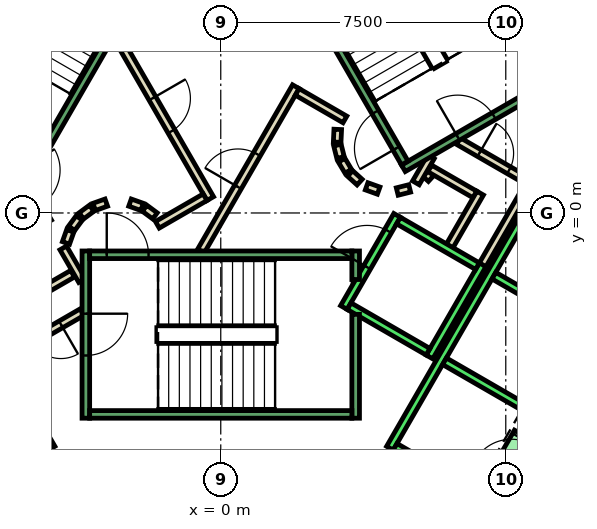
"""IFC4 building model, lengths in metres.
Left out: names, types, materials, properties, quantities, classifications, styles, units other than length and angle.
Written with IfcOpenShell. Run it as: python <this file> out.ifc"""

import sys

from ifc_helpers import new_model, si_unit, direction, frame, frame_2d, origin, place, context, subcontext, project, spatial, polyline, rectangle, outline, extrude, element, fill, save


model = new_model("IFC4")
c1 = context("Model", 3, precision=1e-05, world=origin(), true_north=direction((0.0, 1.0)))
c2 = subcontext(c1, "Body", "Model", "MODEL_VIEW")
j1 = project(units=[si_unit("LENGTHUNIT", "METRE"), si_unit("PLANEANGLEUNIT", "RADIAN")], contexts=[c1])
p1 = place(None, origin())
s1 = spatial("IfcSite", under=j1, at=p1, CompositionType="ELEMENT")
p2 = place(p1, origin())
s2 = spatial("IfcBuilding", under=s1, at=p2, CompositionType="ELEMENT")
p3 = place(p2, frame((0.0, 0.0, 146.6)))
s3 = spatial("IfcBuildingStorey", under=s2, at=p3, CompositionType="ELEMENT", Elevation=146.6)
p4 = place(p3, frame((0.0, 0.0, 3.6)))
e1 = element("IfcWall", 1, at=p4, inside=s3, PredefinedType="SHEAR", context=c2, shape_type="SweptSolid", body=[
    extrude(outline(polyline([(8.767, -6.314), (8.075, -5.914), (7.424, -7.04), (8.117, -7.44), (8.767, -6.314)])), origin(), (0.0, 0.0, 1.0), 0.2),
])
p5 = place(p3, frame((5.39, 0.898, 0.0), z_axis=(0.0, 0.0, 1.0), x_axis=(0.673828488714, 0.738887791073, 0.0)))
e2 = element("IfcWall", 2, at=p5, inside=s3, PredefinedType="PARTITIONING", context=c2, shape_type="SweptSolid", body=[
    extrude(rectangle(XDim=0.263, YDim=0.2, at=frame_2d((0.131, 0.0))), origin(), (0.0, 0.0, 1.0), 3.8),
])
p6 = place(p3, frame((5.499, 1.172, 0.0), z_axis=(0.0, 0.0, 1.0), x_axis=(0.866333505267, -0.499465972466, 0.0)))
e3 = element("IfcWall", 3, at=p6, inside=s3, PredefinedType="PARTITIONING", context=c2, shape_type="SweptSolid", body=[
    extrude(rectangle(XDim=1.374, YDim=0.2, at=frame_2d((0.687, 0.0))), origin(), (0.0, 0.0, 1.0), 3.8),
])
p7 = place(p3, frame((6.826, 0.522, 0.0), z_axis=(0.0, 0.0, 1.0), x_axis=(-0.500016722714, -0.866015748706, 0.0)))
e4 = element("IfcWall", 4, at=p7, inside=s3, PredefinedType="PARTITIONING", context=c2, shape_type="SweptSolid", body=[
    extrude(rectangle(XDim=1.7, YDim=0.2, at=frame_2d((0.85, 0.0))), origin(), (0.0, 0.0, 1.0), 3.8),
])
p8 = place(p3, frame((6.25, 1.894, 0.0), z_axis=(0.0, 0.0, 1.0), x_axis=(0.866043184279, -0.499969202016, 0.0)))
e5 = element("IfcWall", 5, at=p8, inside=s3, PredefinedType="PARTITIONING", context=c2, shape_type="SweptSolid", body=[
    extrude(rectangle(XDim=2.084, YDim=0.2, at=frame_2d((1.042, 0.0))), origin(), (0.0, 0.0, 1.0), 3.8),
])
p9 = place(p8, frame((0.642, 0.0, 0.0)))
e6 = element("IfcOpeningElement", 6, at=p9, cuts=e5, PredefinedType="OPENING", context=c2, shape_type="SweptSolid", body=[
    extrude(rectangle(XDim=0.9, YDim=2.1, at=frame_2d((0.45, 1.05))), frame((0.0, 0.11, 0.0), z_axis=(0.0, -1.0, 0.0), x_axis=(1.0, 0.0, 0.0)), (0.0, 0.0, 1.0), 0.22),
])
p10 = place(p3, frame((8.192, 0.888, 0.0), z_axis=(0.0, 0.0, 1.0), x_axis=(-0.499940625693, -0.866059680843, 0.0)))
e7 = element("IfcWall", 7, at=p10, inside=s3, PredefinedType="PARTITIONING", context=c2, shape_type="SweptSolid", body=[
    extrude(rectangle(XDim=2.68, YDim=0.2, at=frame_2d((1.34, 0.0))), origin(), (0.0, 0.0, 1.0), 3.8),
])
p11 = place(p3, frame((5.135, 0.793, 0.0), z_axis=(0.0, 0.0, 1.0), x_axis=(0.499526442893, 0.866298639529, 0.0)))
e8 = element("IfcWall", 8, at=p11, inside=s3, PredefinedType="PARTITIONING", context=c2, shape_type="SweptSolid", body=[
    extrude(rectangle(XDim=0.791, YDim=0.2, at=frame_2d((0.396, 0.0))), origin(), (0.0, 0.0, 1.0), 3.8),
])
p12 = place(p3, frame((-3.9, -1.599, 0.0), z_axis=(0.0, 0.0, 1.0), x_axis=(-0.865969445389, -0.500096910261, 0.0)))
e9 = element("IfcWall", 9, at=p12, inside=s3, PredefinedType="PARTITIONING", context=c2, shape_type="SweptSolid", body=[
    extrude(rectangle(XDim=1.373, YDim=0.2, at=frame_2d((0.687, 0.0))), origin(), (0.0, 0.0, 1.0), 3.8),
])
p13 = place(p3, frame((-3.65, -2.61, 0.0), z_axis=(0.0, 0.0, 1.0), x_axis=(-0.866072462134, -0.499918483688, 0.0)))
e10 = element("IfcWall", 10, at=p13, inside=s3, PredefinedType="PARTITIONING", context=c2, shape_type="SweptSolid", body=[
    extrude(rectangle(XDim=2.084, YDim=0.2, at=frame_2d((1.042, 0.0))), origin(), (0.0, 0.0, 1.0), 3.8),
])
p14 = place(p13, frame((0.642, 0.0, 0.0)))
e11 = element("IfcOpeningElement", 11, at=p14, cuts=e10, PredefinedType="OPENING", context=c2, shape_type="SweptSolid", body=[
    extrude(rectangle(XDim=0.9, YDim=2.1, at=frame_2d((0.45, 1.05))), frame((0.0, 0.11, 0.0), z_axis=(0.0, -1.0, 0.0), x_axis=(1.0, 0.0, 0.0)), (0.0, 0.0, 1.0), 0.22),
])
p15 = place(p3, frame((-4.145, -0.92, 0.0), z_axis=(0.0, 0.0, 1.0), x_axis=(0.499743786207, -0.866173278362, 0.0)))
e12 = element("IfcWall", 12, at=p15, inside=s3, PredefinedType="PARTITIONING", context=c2, shape_type="SweptSolid", body=[
    extrude(rectangle(XDim=0.991, YDim=0.2, at=frame_2d((0.495, 0.0))), origin(), (0.0, 0.0, 1.0), 3.8),
])
p16 = place(p3, frame((-0.52, -1.0, 0.0), z_axis=(0.0, 0.0, 1.0), x_axis=(0.50011622646, 0.865958290007, 0.0)))
e13 = element("IfcWall", 13, at=p16, inside=s3, PredefinedType="PARTITIONING", context=c2, shape_type="SweptSolid", body=[
    extrude(rectangle(XDim=4.991, YDim=0.2, at=frame_2d((2.496, 0.0))), origin(), (0.0, 0.0, 1.0), 3.8),
])
p17 = place(p16, frame((1.945, 0.0, 0.0)))
e14 = element("IfcOpeningElement", 14, at=p17, cuts=e13, PredefinedType="OPENING", context=c2, shape_type="SweptSolid", body=[
    extrude(rectangle(XDim=1.0, YDim=2.1, at=frame_2d((0.5, 1.05))), frame((0.0, 0.11, 0.0), z_axis=(0.0, -1.0, 0.0), x_axis=(1.0, 0.0, 0.0)), (0.0, 0.0, 1.0), 0.22),
])
p18 = place(p3, frame((2.012, 3.186, 0.0), z_axis=(0.0, 0.0, 1.0), x_axis=(0.865891012941, -0.500232699559, 0.0)))
e15 = element("IfcWall", 15, at=p18, inside=s3, PredefinedType="PARTITIONING", context=c2, shape_type="SweptSolid", body=[
    extrude(rectangle(XDim=1.449, YDim=0.2, at=frame_2d((0.725, 0.0))), origin(), (0.0, 0.0, 1.0), 3.8),
])
p19 = place(p3, frame((3.079, 2.199, 0.0), z_axis=(0.0, 0.0, 1.0), x_axis=(-0.047771483479, -0.998858290933, 0.0)))
e16 = element("IfcWall", 16, at=p19, inside=s3, PredefinedType="PARTITIONING", context=c2, shape_type="SweptSolid", body=[
    extrude(rectangle(XDim=0.337, YDim=0.2, at=frame_2d((0.169, 0.0))), origin(), (0.0, 0.0, 1.0), 3.8),
])
p20 = place(p3, frame((3.07, 1.786, 0.0), z_axis=(0.0, 0.0, 1.0), x_axis=(0.242705583207, -0.970099994784, 0.0)))
e17 = element("IfcWall", 17, at=p20, inside=s3, PredefinedType="PARTITIONING", context=c2, shape_type="SweptSolid", body=[
    extrude(rectangle(XDim=0.338, YDim=0.2, at=frame_2d((0.169, 0.0))), origin(), (0.0, 0.0, 1.0), 3.8),
])
for number, where, z_axis, x_axis in (
    (18, (3.182, 1.388, 0.0), (0.0, 0.0, 1.0), (0.512, -0.859, 0.0)),
    (19, (3.404, 1.039, 0.0), (0.0, 0.0, 1.0), (0.74, -0.672, 0.0)),
):
    element("IfcWall", number, at=place(p3, frame(where, z_axis=z_axis, x_axis=x_axis)), inside=s3, PredefinedType="PARTITIONING", context=c2, shape_type="SweptSolid", body=[
        extrude(rectangle(XDim=0.338, YDim=0.2, at=frame_2d((0.169, 0.0))), origin(), (0.0, 0.0, 1.0), 3.8),
    ])
p21 = place(p3, frame((3.838, 0.702, 0.0), z_axis=(0.0, 0.0, 1.0), x_axis=(0.941035081519, -0.338308993895, 0.0)))
e20 = element("IfcWall", 20, at=p21, inside=s3, PredefinedType="PARTITIONING", context=c2, shape_type="SweptSolid", body=[
    extrude(rectangle(XDim=0.337, YDim=0.2, at=frame_2d((0.168, 0.0))), origin(), (0.0, 0.0, 1.0), 3.8),
])
p22 = place(p3, frame((4.644, 0.564, 0.0), z_axis=(0.0, 0.0, 1.0), x_axis=(0.969929076366, 0.243387729394, 0.0)))
e21 = element("IfcWall", 21, at=p22, inside=s3, PredefinedType="PARTITIONING", context=c2, shape_type="SweptSolid", body=[
    extrude(rectangle(XDim=0.337, YDim=0.2, at=frame_2d((0.168, 0.0))), origin(), (0.0, 0.0, 1.0), 3.8),
])
p23 = place(p3, frame((-2.771, 4.7, 0.0), z_axis=(0.0, 0.0, 1.0), x_axis=(0.499969479948, -0.866043023828, 0.0)))
e22 = element("IfcWall", 22, at=p23, inside=s3, PredefinedType="PARTITIONING", context=c2, shape_type="SweptSolid", body=[
    extrude(rectangle(XDim=4.99, YDim=0.2, at=frame_2d((2.495, 0.0))), origin(), (0.0, 0.0, 1.0), 3.8),
])
p24 = place(p23, frame((1.945, 0.0, 0.0)))
e23 = element("IfcOpeningElement", 23, at=p24, cuts=e22, PredefinedType="OPENING", context=c2, shape_type="SweptSolid", body=[
    extrude(rectangle(XDim=1.0, YDim=2.1, at=frame_2d((0.5, 1.05))), frame((0.0, 0.11, 0.0), z_axis=(0.0, -1.0, 0.0), x_axis=(1.0, 0.0, 0.0)), (0.0, 0.0, 1.0), 0.22),
])
p25 = place(p3, frame((-0.412, 0.414, 0.0), z_axis=(0.0, 0.0, 1.0), x_axis=(-0.866017369001, -0.500013916395, 0.0)))
e24 = element("IfcWall", 24, at=p25, inside=s3, PredefinedType="PARTITIONING", context=c2, shape_type="SweptSolid", body=[
    extrude(rectangle(XDim=1.45, YDim=0.2, at=frame_2d((0.725, 0.0))), origin(), (0.0, 0.0, 1.0), 3.8),
])
p26 = place(p3, frame((-1.731, -0.077, 0.0), z_axis=(0.0, 0.0, 1.0), x_axis=(-0.804311165252, 0.594208338422, 0.0)))
e25 = element("IfcWall", 25, at=p26, inside=s3, PredefinedType="PARTITIONING", context=c2, shape_type="SweptSolid", body=[
    extrude(rectangle(XDim=0.338, YDim=0.2, at=frame_2d((0.169, 0.0))), origin(), (0.0, 0.0, 1.0), 3.8),
])
p27 = place(p3, frame((-2.07, 0.16, 0.0), z_axis=(0.0, 0.0, 1.0), x_axis=(-0.942199461132, 0.335052496547, 0.0)))
e26 = element("IfcWall", 26, at=p27, inside=s3, PredefinedType="PARTITIONING", context=c2, shape_type="SweptSolid", body=[
    extrude(rectangle(XDim=0.337, YDim=0.2, at=frame_2d((0.169, 0.0))), origin(), (0.0, 0.0, 1.0), 3.8),
])
p28 = place(p3, frame((-3.012, 0.273, 0.0), z_axis=(0.0, 0.0, 1.0), x_axis=(-0.942280615813, -0.334824194261, 0.0)))
e27 = element("IfcWall", 27, at=p28, inside=s3, PredefinedType="PARTITIONING", context=c2, shape_type="SweptSolid", body=[
    extrude(rectangle(XDim=0.338, YDim=0.2, at=frame_2d((0.169, 0.0))), origin(), (0.0, 0.0, 1.0), 3.8),
])
p29 = place(p3, frame((-3.397, 0.124, 0.0), z_axis=(0.0, 0.0, 1.0), x_axis=(-0.804311165252, -0.594208338422, 0.0)))
e28 = element("IfcWall", 28, at=p29, inside=s3, PredefinedType="PARTITIONING", context=c2, shape_type="SweptSolid", body=[
    extrude(rectangle(XDim=0.338, YDim=0.2, at=frame_2d((0.169, 0.0))), origin(), (0.0, 0.0, 1.0), 3.8),
])
p30 = place(p3, frame((-3.723, -0.131, 0.0), z_axis=(0.0, 0.0, 1.0), x_axis=(-0.594675113454, -0.803966112121, 0.0)))
e29 = element("IfcWall", 29, at=p30, inside=s3, PredefinedType="PARTITIONING", context=c2, shape_type="SweptSolid", body=[
    extrude(rectangle(XDim=0.338, YDim=0.2, at=frame_2d((0.169, 0.0))), origin(), (0.0, 0.0, 1.0), 3.8),
])
p31 = place(p3, frame((-3.96, -0.47, 0.0), z_axis=(0.0, 0.0, 1.0), x_axis=(-0.334824194261, -0.942280615813, 0.0)))
e30 = element("IfcWall", 30, at=p31, inside=s3, PredefinedType="PARTITIONING", context=c2, shape_type="SweptSolid", body=[
    extrude(rectangle(XDim=0.338, YDim=0.2, at=frame_2d((0.169, 0.0))), origin(), (0.0, 0.0, 1.0), 3.8),
])
p32 = place(p3, frame((-9.751, 2.99, 0.0), z_axis=(0.0, 0.0, 1.0), x_axis=(0.50000090737, -0.866024879913, 0.0)))
e31 = element("IfcWall", 31, at=p32, inside=s3, PredefinedType="STANDARD", context=c2, shape_type="SweptSolid", body=[
    extrude(rectangle(XDim=10.6, YDim=0.2, at=frame_2d((5.3, 0.0))), origin(), (0.0, 0.0, 1.0), 3.8),
])
p33 = place(p3, frame((3.24, -2.488, 0.0), z_axis=(0.0, 0.0, 1.0), x_axis=(0.49994636267, 0.866056369097, 0.0)))
e32 = element("IfcWall", 32, at=p33, inside=s3, PredefinedType="STANDARD", context=c2, shape_type="SweptSolid", body=[
    extrude(rectangle(XDim=2.8, YDim=0.2, at=frame_2d((1.4, 0.0))), origin(), (0.0, 0.0, 1.0), 3.8),
])
p34 = place(p33, frame((1.225, 0.0, 0.0)))
e33 = element("IfcOpeningElement", 33, at=p34, cuts=e32, PredefinedType="OPENING", context=c2, shape_type="SweptSolid", body=[
    extrude(rectangle(XDim=1.1, YDim=2.1, at=frame_2d((0.55, 1.05))), frame((0.0, 0.11, 0.0), z_axis=(0.0, -1.0, 0.0), x_axis=(1.0, 0.0, 0.0)), (0.0, 0.0, 1.0), 0.22),
])
p35 = place(p3, frame((5.492, -3.788, 0.0), z_axis=(0.0, 0.0, 1.0), x_axis=(0.500011755427, 0.866018616679, 0.0)))
e34 = element("IfcWall", 34, at=p35, inside=s3, PredefinedType="STANDARD", context=c2, shape_type="SweptSolid", body=[
    extrude(rectangle(XDim=2.8, YDim=0.2, at=frame_2d((1.4, 0.0))), origin(), (0.0, 0.0, 1.0), 3.8),
])
p36 = place(p3, frame((3.377, -2.452, 0.0), z_axis=(0.0, 0.0, 1.0), x_axis=(0.865955154139, -0.50012165622, 0.0)))
e35 = element("IfcWall", 35, at=p36, inside=s3, PredefinedType="STANDARD", context=c2, shape_type="SweptSolid", body=[
    extrude(rectangle(XDim=2.4, YDim=0.2, at=frame_2d((1.2, 0.0))), origin(), (0.0, 0.0, 1.0), 3.8),
])
p37 = place(p3, frame((4.677, -0.2, 0.0), z_axis=(0.0, 0.0, 1.0), x_axis=(0.865973769406, -0.500089422704, 0.0)))
e36 = element("IfcWall", 36, at=p37, inside=s3, PredefinedType="STANDARD", context=c2, shape_type="SweptSolid", body=[
    extrude(rectangle(XDim=2.399, YDim=0.2, at=frame_2d((1.2, 0.0))), origin(), (0.0, 0.0, 1.0), 3.8),
])
p38 = place(p3, frame((4.451, -6.19, 0.0), z_axis=(0.0, 0.0, 1.0), x_axis=(0.50000090737, 0.866024879913, 0.0)))
e37 = element("IfcWall", 37, at=p38, inside=s3, PredefinedType="STANDARD", context=c2, shape_type="SweptSolid", body=[
    extrude(rectangle(XDim=10.6, YDim=0.2, at=frame_2d((5.3, 0.0))), origin(), (0.0, 0.0, 1.0), 3.8),
])
for number, where, z_axis, x_axis in (
    (38, (4.588, -6.153, 0.0), (0.0, 0.0, 1.0), (0.866, -0.5, 0.0)),
    (39, (5.888, -3.902, 0.0), (0.0, 0.0, 1.0), (0.866, -0.5, 0.0)),
    (40, (7.188, -1.65, 0.0), (0.0, 0.0, 1.0), (0.866, -0.5, 0.0)),
):
    element("IfcWall", number, at=place(p3, frame(where, z_axis=z_axis, x_axis=x_axis)), inside=s3, PredefinedType="STANDARD", context=c2, shape_type="SweptSolid", body=[
        extrude(rectangle(XDim=2.5, YDim=0.2, at=frame_2d((1.25, 0.0))), origin(), (0.0, 0.0, 1.0), 3.8),
    ])
p39 = place(p3, frame((7.598, -7.14, 0.0), z_axis=(0.0, 0.0, 1.0), x_axis=(0.500362116554, 0.865816234728, 0.0)))
e41 = element("IfcWall", 41, at=p39, inside=s3, PredefinedType="STANDARD", context=c2, shape_type="SweptSolid", body=[
    extrude(rectangle(XDim=1.299, YDim=1.2, at=frame_2d((0.65, 0.0))), origin(), (0.0, 0.0, 1.0), 2.4),
])
p40 = place(p39, frame((0.1, 0.0, 0.0)))
e42 = element("IfcOpeningElement", 42, at=p40, cuts=e41, PredefinedType="OPENING", context=c2, shape_type="SweptSolid", body=[
    extrude(rectangle(XDim=1.1, YDim=2.3, at=frame_2d((0.55, 1.15))), frame((0.0, 0.61, 0.0), z_axis=(0.0, -1.0, 0.0), x_axis=(1.0, 0.0, 0.0)), (0.0, 0.0, 1.0), 1.22),
])
p41 = place(p3, frame((-3.55, -1.0, 0.0), z_axis=(0.0, 0.0, 1.0), x_axis=(0.0, -1.0, 0.0)))
e43 = element("IfcWall", 43, at=p41, inside=s3, PredefinedType="STANDARD", context=c2, shape_type="SweptSolid", body=[
    extrude(rectangle(XDim=4.4, YDim=0.2, at=frame_2d((2.2, 0.0))), origin(), (0.0, 0.0, 1.0), 3.8),
])
p42 = place(p41, frame((1.65, 0.0, 0.0)))
e44 = element("IfcOpeningElement", 44, at=p42, cuts=e43, PredefinedType="OPENING", context=c2, shape_type="SweptSolid", body=[
    extrude(rectangle(XDim=1.1, YDim=2.2, at=frame_2d((0.55, 1.1))), frame((0.0, 0.11, 0.0), z_axis=(0.0, -1.0, 0.0), x_axis=(1.0, 0.0, 0.0)), (0.0, 0.0, 1.0), 0.22),
])
p43 = place(p3, frame((3.55, -2.667, 0.0), z_axis=(0.0, 0.0, 1.0), x_axis=(0.0, -1.0, 0.0)))
e45 = element("IfcWall", 45, at=p43, inside=s3, PredefinedType="STANDARD", context=c2, shape_type="SweptSolid", body=[
    extrude(rectangle(XDim=2.733, YDim=0.2, at=frame_2d((1.366, 0.0))), origin(), (0.0, 0.0, 1.0), 3.8),
])
p44 = place(p3, frame((3.55, -1.0, 0.0), z_axis=(0.0, 0.0, 1.0), x_axis=(0.0, -1.0, 0.0)))
e46 = element("IfcWall", 46, at=p44, inside=s3, PredefinedType="STANDARD", context=c2, shape_type="SweptSolid", body=[
    extrude(rectangle(XDim=0.751, YDim=0.2, at=frame_2d((0.375, 0.0))), origin(), (0.0, 0.0, 1.0), 3.8),
])
p45 = place(p3, frame((-3.45, -1.1, 0.0), z_axis=(0.0, 0.0, 1.0), x_axis=(1.0, 0.0, 0.0)))
e47 = element("IfcWall", 47, at=p45, inside=s3, PredefinedType="STANDARD", context=c2, shape_type="SweptSolid", body=[
    extrude(rectangle(XDim=6.9, YDim=0.2, at=frame_2d((3.45, 0.0))), origin(), (0.0, 0.0, 1.0), 3.8),
])
p46 = place(p45, frame((0.45, 0.0, 0.0)))
e48 = element("IfcOpeningElement", 48, at=p46, cuts=e47, PredefinedType="OPENING", context=c2, shape_type="SweptSolid", body=[
    extrude(rectangle(XDim=1.1, YDim=2.2, at=frame_2d((0.55, 1.1))), frame((0.0, 0.11, 0.0), z_axis=(0.0, -1.0, 0.0), x_axis=(1.0, 0.0, 0.0)), (0.0, 0.0, 1.0), 0.22),
])
p47 = place(p3, frame((-3.45, -5.3, 0.0), z_axis=(0.0, 0.0, 1.0), x_axis=(1.0, 0.0, 0.0)))
e49 = element("IfcWall", 49, at=p47, inside=s3, PredefinedType="STANDARD", context=c2, shape_type="SweptSolid", body=[
    extrude(rectangle(XDim=6.9, YDim=0.2, at=frame_2d((3.45, 0.0))), origin(), (0.0, 0.0, 1.0), 3.8),
])
p48 = place(p3, frame((4.806, 1.176, 0.0), z_axis=(0.0, 0.0, 1.0), x_axis=(0.866059941101, 0.499940174841, 0.0)))
e50 = element("IfcWall", 50, at=p48, inside=s3, PredefinedType="STANDARD", context=c2, shape_type="SweptSolid", body=[
    extrude(rectangle(XDim=4.4, YDim=0.2, at=frame_2d((2.2, 0.0))), origin(), (0.0, 0.0, 1.0), 3.8),
])
p49 = place(p48, frame((1.65, 0.0, 0.0)))
e51 = element("IfcOpeningElement", 51, at=p49, cuts=e50, PredefinedType="OPENING", context=c2, shape_type="SweptSolid", body=[
    extrude(rectangle(XDim=1.1, YDim=2.2, at=frame_2d((0.55, 1.1))), frame((0.0, 0.11, 0.0), z_axis=(0.0, -1.0, 0.0), x_axis=(1.0, 0.0, 0.0)), (0.0, 0.0, 1.0), 0.22),
])
p50 = place(p3, frame((4.843, 1.312, 0.0), z_axis=(0.0, 0.0, 1.0), x_axis=(-0.499963383562, 0.866046543262, 0.0)))
e52 = element("IfcWall", 52, at=p50, inside=s3, PredefinedType="STANDARD", context=c2, shape_type="SweptSolid", body=[
    extrude(rectangle(XDim=6.9, YDim=0.2, at=frame_2d((3.45, 0.0))), origin(), (0.0, 0.0, 1.0), 3.8),
])
p51 = place(p50, frame((0.45, 0.0, 0.0)))
e53 = element("IfcOpeningElement", 53, at=p51, cuts=e52, PredefinedType="OPENING", context=c2, shape_type="SweptSolid", body=[
    extrude(rectangle(XDim=1.1, YDim=2.2, at=frame_2d((0.55, 1.1))), frame((0.0, 0.11, 0.0), z_axis=(0.0, -1.0, 0.0), x_axis=(1.0, 0.0, 0.0)), (0.0, 0.0, 1.0), 0.22),
])
p52 = place(p3, frame((8.48, 3.412, 0.0), z_axis=(0.0, 0.0, 1.0), x_axis=(-0.499978703459, 0.866037698999, 0.0)))
e54 = element("IfcWall", 54, at=p52, inside=s3, PredefinedType="STANDARD", context=c2, shape_type="SweptSolid", body=[
    extrude(rectangle(XDim=6.9, YDim=0.2, at=frame_2d((3.45, 0.0))), origin(), (0.0, 0.0, 1.0), 3.8),
])
p53 = place(p3, frame((-1.393, 7.288, 0.0), z_axis=(0.0, 0.0, 1.0), x_axis=(-0.499963383562, -0.866046543262, 0.0)))
e55 = element("IfcWall", 55, at=p53, inside=s3, PredefinedType="STANDARD", context=c2, shape_type="SweptSolid", body=[
    extrude(rectangle(XDim=6.9, YDim=0.2, at=frame_2d((3.45, 0.0))), origin(), (0.0, 0.0, 1.0), 3.8),
])
p54 = place(p53, frame((0.45, 0.0, 0.0)))
e56 = element("IfcOpeningElement", 56, at=p54, cuts=e55, PredefinedType="OPENING", context=c2, shape_type="SweptSolid", body=[
    extrude(rectangle(XDim=1.1, YDim=2.2, at=frame_2d((0.55, 1.1))), frame((0.0, 0.11, 0.0), z_axis=(0.0, -1.0, 0.0), x_axis=(1.0, 0.0, 0.0)), (0.0, 0.0, 1.0), 0.22),
])
p55 = place(p17, origin())
e57 = element("IfcDoor", 57, at=p55, inside=s3, OperationType="SINGLE_SWING_LEFT", PredefinedType="DOOR", context=c2, shape_type="SweptSolid", body=[
    extrude(rectangle(XDim=1.0, YDim=2.1, at=frame_2d((0.5, 1.05))), frame((0.0, 0.025, 0.0), z_axis=(0.0, -1.0, 0.0), x_axis=(1.0, 0.0, 0.0)), (0.0, 0.0, 1.0), 0.05),
])
fill(e14, e57)
p56 = place(p24, origin())
e58 = element("IfcDoor", 58, at=p56, inside=s3, OperationType="SINGLE_SWING_RIGHT", PredefinedType="DOOR", context=c2, shape_type="SweptSolid", body=[
    extrude(rectangle(XDim=1.0, YDim=2.1, at=frame_2d((0.5, 1.05))), frame((0.0, 0.025, 0.0), z_axis=(0.0, -1.0, 0.0), x_axis=(1.0, 0.0, 0.0)), (0.0, 0.0, 1.0), 0.05),
])
fill(e23, e58)
p57 = place(p9, origin())
e59 = element("IfcDoor", 59, at=p57, inside=s3, OperationType="SINGLE_SWING_LEFT", PredefinedType="DOOR", context=c2, shape_type="SweptSolid", body=[
    extrude(rectangle(XDim=0.9, YDim=2.1, at=frame_2d((0.45, 1.05))), frame((0.0, 0.025, 0.0), z_axis=(0.0, -1.0, 0.0), x_axis=(1.0, 0.0, 0.0)), (0.0, 0.0, 1.0), 0.05),
])
fill(e6, e59)
p58 = place(p14, origin())
e60 = element("IfcDoor", 60, at=p58, inside=s3, OperationType="SINGLE_SWING_LEFT", PredefinedType="DOOR", context=c2, shape_type="SweptSolid", body=[
    extrude(rectangle(XDim=0.9, YDim=2.1, at=frame_2d((0.45, 1.05))), frame((0.0, 0.025, 0.0), z_axis=(0.0, -1.0, 0.0), x_axis=(1.0, 0.0, 0.0)), (0.0, 0.0, 1.0), 0.05),
])
fill(e11, e60)
p59 = place(p40, origin())
e61 = element("IfcDoor", 61, at=p59, inside=s3, OperationType="SLIDING_TO_LEFT", PredefinedType="DOOR", context=c2, shape_type="SweptSolid", body=[
    extrude(rectangle(XDim=1.1, YDim=2.3, at=frame_2d((0.55, 1.15))), frame((0.0, 0.025, 0.0), z_axis=(0.0, -1.0, 0.0), x_axis=(1.0, 0.0, 0.0)), (0.0, 0.0, 1.0), 0.05),
])
fill(e42, e61)
p60 = place(p34, origin())
e62 = element("IfcDoor", 62, at=p60, inside=s3, OperationType="SLIDING_TO_LEFT", PredefinedType="DOOR", context=c2, shape_type="SweptSolid", body=[
    extrude(rectangle(XDim=1.1, YDim=2.1, at=frame_2d((0.55, 1.05))), frame((0.0, 0.025, 0.0), z_axis=(0.0, -1.0, 0.0), x_axis=(1.0, 0.0, 0.0)), (0.0, 0.0, 1.0), 0.05),
])
fill(e33, e62)
p61 = place(p46, origin())
e63 = element("IfcDoor", 63, at=p61, inside=s3, OperationType="SINGLE_SWING_LEFT", PredefinedType="DOOR", context=c2, shape_type="SweptSolid", body=[
    extrude(rectangle(XDim=1.1, YDim=2.2, at=frame_2d((0.55, 1.1))), frame((0.0, 0.025, 0.0), z_axis=(0.0, -1.0, 0.0), x_axis=(1.0, 0.0, 0.0)), (0.0, 0.0, 1.0), 0.05),
])
fill(e48, e63)
p62 = place(p42, origin())
e64 = element("IfcDoor", 64, at=p62, inside=s3, OperationType="SINGLE_SWING_LEFT", PredefinedType="DOOR", context=c2, shape_type="SweptSolid", body=[
    extrude(rectangle(XDim=1.1, YDim=2.2, at=frame_2d((0.55, 1.1))), frame((0.0, 0.025, 0.0), z_axis=(0.0, -1.0, 0.0), x_axis=(1.0, 0.0, 0.0)), (0.0, 0.0, 1.0), 0.05),
])
fill(e44, e64)
p63 = place(p51, origin())
e65 = element("IfcDoor", 65, at=p63, inside=s3, OperationType="SINGLE_SWING_LEFT", PredefinedType="DOOR", context=c2, shape_type="SweptSolid", body=[
    extrude(rectangle(XDim=1.1, YDim=2.2, at=frame_2d((0.55, 1.1))), frame((0.0, 0.025, 0.0), z_axis=(0.0, -1.0, 0.0), x_axis=(1.0, 0.0, 0.0)), (0.0, 0.0, 1.0), 0.05),
])
fill(e53, e65)
p64 = place(p49, origin())
e66 = element("IfcDoor", 66, at=p64, inside=s3, OperationType="SINGLE_SWING_LEFT", PredefinedType="DOOR", context=c2, shape_type="SweptSolid", body=[
    extrude(rectangle(XDim=1.1, YDim=2.2, at=frame_2d((0.55, 1.1))), frame((0.0, 0.025, 0.0), z_axis=(0.0, -1.0, 0.0), x_axis=(1.0, 0.0, 0.0)), (0.0, 0.0, 1.0), 0.05),
])
fill(e51, e66)
save(model, sys.argv[1])
